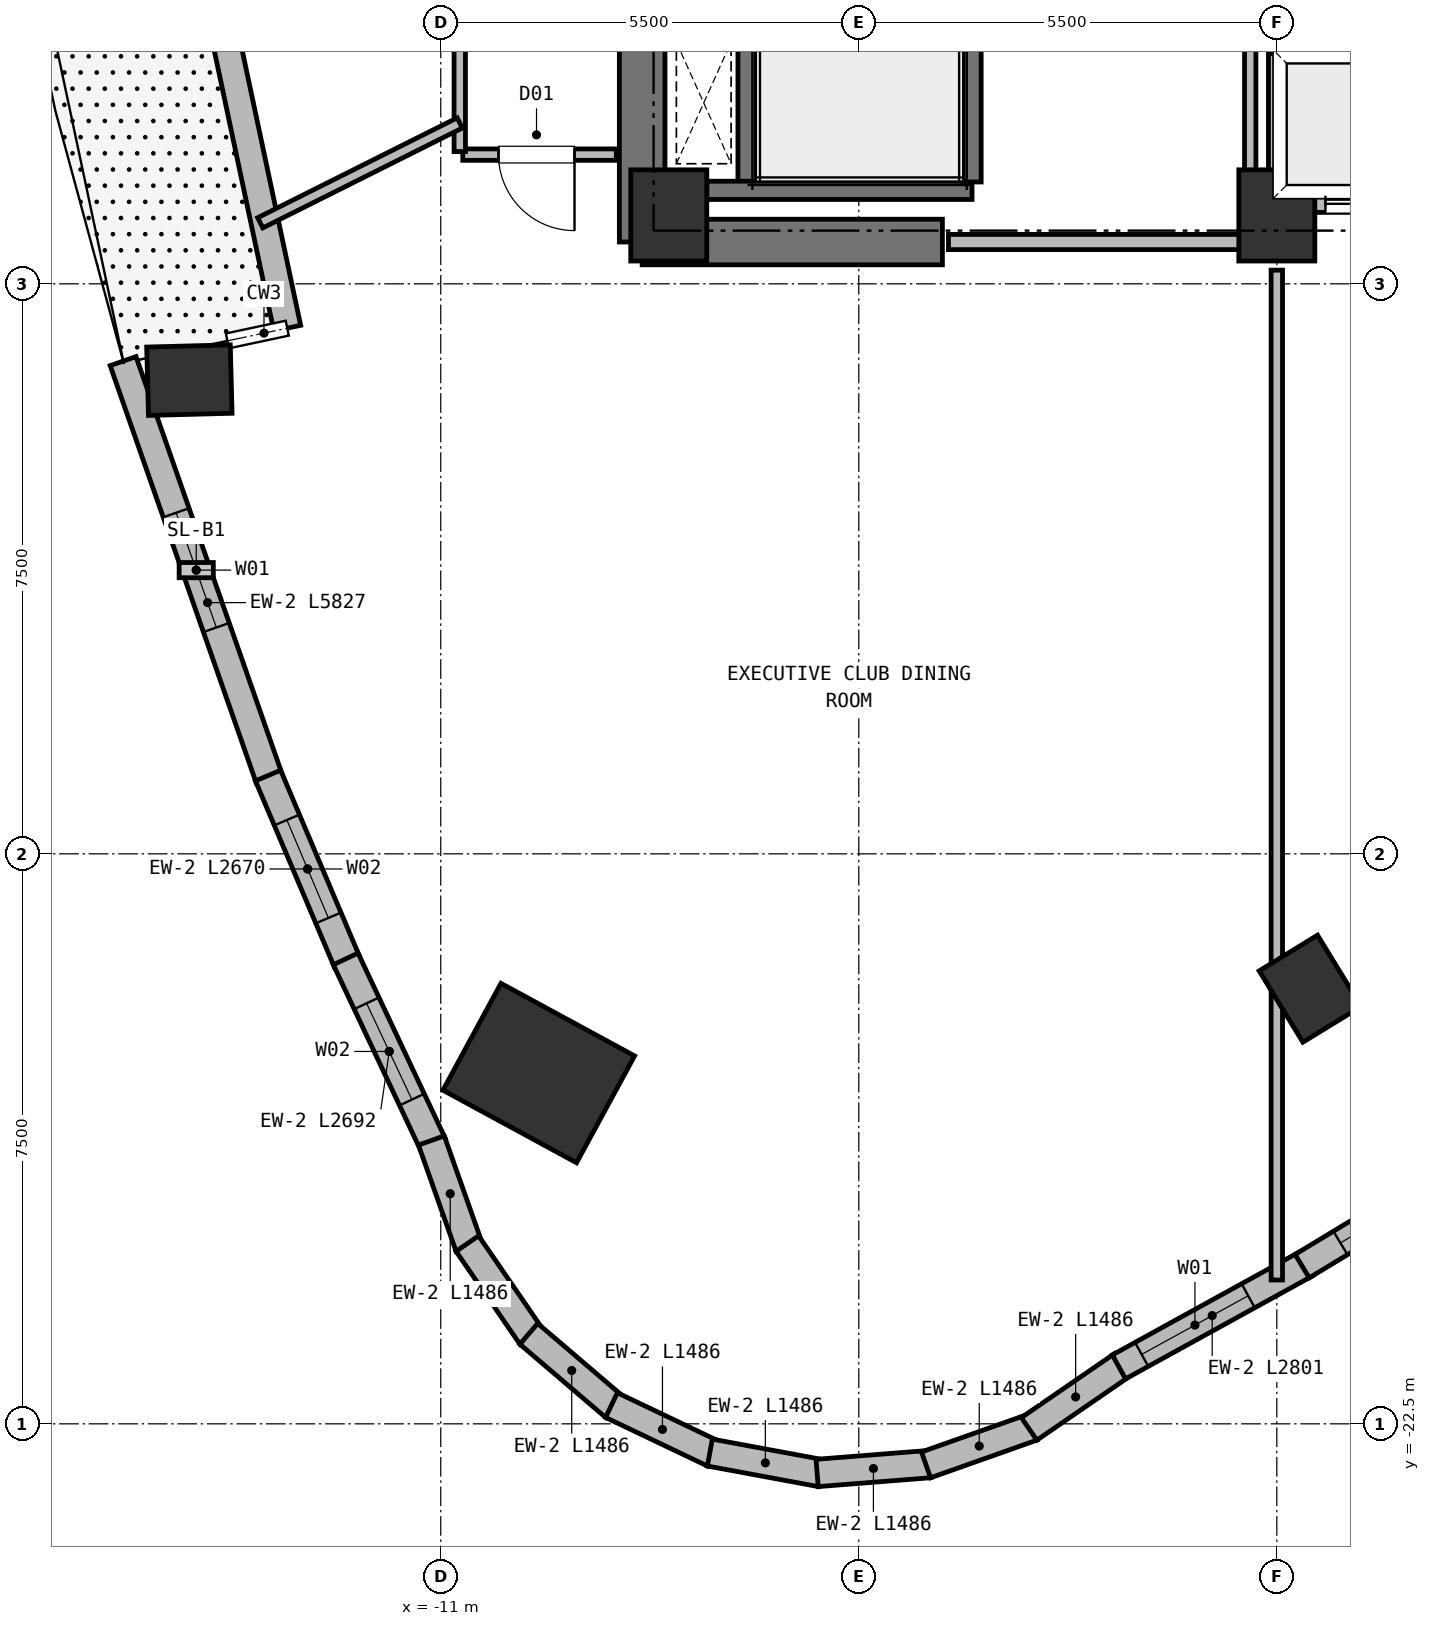
"""IFC4 building model, lengths in metres.
Left out: names, types, materials, properties, quantities, classifications, styles, units other than length and angle.
Written with IfcOpenShell. Run it as: python <this file> out.ifc"""

import sys

from ifc_helpers import new_model, si_unit, direction, frame, frame_2d, origin, origin_2d, place, context, subcontext, project, spatial, rectangle, extrude, element, fill, save


model = new_model("IFC4")
c1 = context("Model", 3, precision=1e-05, world=origin(), true_north=direction((0.0, 1.0)))
c2 = subcontext(c1, "Body", "Model", "MODEL_VIEW")
j1 = project(units=[si_unit("LENGTHUNIT", "METRE"), si_unit("PLANEANGLEUNIT", "RADIAN")], contexts=[c1])
p1 = place(None, origin())
s1 = spatial("IfcSite", under=j1, at=p1, CompositionType="ELEMENT")
p2 = place(p1, origin())
s2 = spatial("IfcBuilding", under=s1, at=p2, CompositionType="ELEMENT")
p3 = place(p2, frame((0.0, 0.0, 164.75)))
s3 = spatial("IfcBuildingStorey", under=s2, at=p3, CompositionType="ELEMENT", Elevation=164.75)
for number, where, z_axis, x_axis in (
    (1, (-8.0, -6.6, 0.0), (0.0, 0.0, 1.0), (1.0, 0.0, 0.0)),
    (2, (0.0, -6.6, 0.0), (0.0, 0.0, 1.0), (1.0, 0.0, 0.0)),
):
    element("IfcColumn", number, at=place(p3, frame(where, z_axis=z_axis, x_axis=x_axis)), inside=s3, PredefinedType="COLUMN", context=c2, shape_type="SweptSolid", body=[
        extrude(rectangle(XDim=1.0, YDim=1.2, at=origin_2d()), origin(), (0.0, 0.0, 1.0), 3.75),
    ])
p4 = place(p3, frame((-8.35, -6.95, 0.0), z_axis=(0.0, 0.0, 1.0), x_axis=(1.0, 0.0, 0.0)))
e3 = element("IfcWall", 3, at=p4, inside=s3, PredefinedType="SHEAR", context=c2, shape_type="SweptSolid", body=[
    extrude(rectangle(XDim=3.95, YDim=0.6, at=frame_2d((1.975, 0.0))), origin(), (0.0, 0.0, 1.0), 3.44),
])
p5 = place(p3, frame((-8.35, -6.95, 0.0), z_axis=(0.0, 0.0, 1.0), x_axis=(0.0, 1.0, 0.0)))
e4 = element("IfcWall", 4, at=p5, inside=s3, PredefinedType="SHEAR", context=c2, shape_type="SweptSolid", body=[
    extrude(rectangle(XDim=8.1, YDim=0.6, at=frame_2d((4.05, 0.0))), origin(), (0.0, 0.0, 1.0), 3.44),
])
p6 = place(p3, frame((-14.307, -8.768, 0.0), z_axis=(0.0, 0.0, 1.0), x_axis=(-0.026176948308, 0.999657324976, 0.0)))
e5 = element("IfcColumn", 5, at=p6, inside=s3, PredefinedType="COLUMN", context=c2, shape_type="SweptSolid", body=[
    extrude(rectangle(XDim=0.9, YDim=1.1, at=origin_2d()), origin(), (0.0, 0.0, 1.0), 3.75),
])
p7 = place(p3, frame((-9.71, -17.885, 0.0), z_axis=(0.0, 0.0, 1.0), x_axis=(0.47715876026, 0.878817112662, 0.0)))
e6 = element("IfcColumn", 6, at=p7, inside=s3, PredefinedType="COLUMN", context=c2, shape_type="SweptSolid", body=[
    extrude(rectangle(XDim=1.6, YDim=2.0, at=origin_2d()), origin(), (0.0, 0.0, 1.0), 3.75),
])
p8 = place(p3, frame((0.439, -16.774, 0.0), z_axis=(0.0, 0.0, 1.0), x_axis=(0.852640164354, 0.522498564716, 0.0)))
e7 = element("IfcColumn", 7, at=p8, inside=s3, PredefinedType="COLUMN", context=c2, shape_type="SweptSolid", body=[
    extrude(rectangle(XDim=0.9, YDim=1.1, at=origin_2d()), origin(), (0.0, 0.0, 1.0), 3.75),
])
p9 = place(p3, frame((-13.02, -8.083, 0.0), z_axis=(0.0, 0.0, 1.0), x_axis=(-0.207898343446, 0.97815043771, 0.0)))
e8 = element("IfcWall", 8, at=p9, inside=s3, PredefinedType="SOLIDWALL", context=c2, shape_type="SweptSolid", body=[
    extrude(rectangle(XDim=10.4, YDim=0.36, at=frame_2d((5.2, 0.0))), origin(), (0.0, 0.0, 1.0), 3.44),
])
p10 = place(p9, frame((4.375, 0.0, 0.0)))
e9 = element("IfcOpeningElement", 9, at=p10, cuts=e8, PredefinedType="OPENING", context=c2, shape_type="SweptSolid", body=[
    extrude(rectangle(XDim=1.65, YDim=2.25, at=frame_2d((0.825, 1.125))), frame((0.0, 0.19, 0.0), z_axis=(0.0, -1.0, 0.0), x_axis=(1.0, 0.0, 0.0)), (0.0, 0.0, 1.0), 0.38),
])
p11 = place(p3, frame((-13.254, -14.017, 0.0), z_axis=(0.0, 0.0, 1.0), x_axis=(-0.330408278921, 0.943838105408, 0.0)))
e10 = element("IfcWall", 10, at=p11, inside=s3, PredefinedType="SOLIDWALL", context=c2, shape_type="SweptSolid", body=[
    extrude(rectangle(XDim=5.827, YDim=0.36, at=frame_2d((2.914, 0.0))), origin(), (0.0, 0.0, 1.0), 3.44),
])
p12 = place(p11, frame((2.114, 0.0, 0.72)))
e11 = element("IfcOpeningElement", 11, at=p12, cuts=e10, PredefinedType="OPENING", context=c2, shape_type="SweptSolid", body=[
    extrude(rectangle(XDim=1.6, YDim=1.88, at=frame_2d((0.8, 0.94))), frame((0.0, 0.19, 0.0), z_axis=(0.0, -1.0, 0.0), x_axis=(1.0, 0.0, 0.0)), (0.0, 0.0, 1.0), 0.38),
])
p13 = place(p3, frame((-12.23, -16.428, 0.0), z_axis=(0.0, 0.0, 1.0), x_axis=(-0.39032906304, 0.9206754165, 0.0)))
e12 = element("IfcWall", 12, at=p13, inside=s3, PredefinedType="SOLIDWALL", context=c2, shape_type="SweptSolid", body=[
    extrude(rectangle(XDim=2.669, YDim=0.36, at=frame_2d((1.335, 0.0))), origin(), (0.0, 0.0, 1.0), 3.44),
])
p14 = place(p13, frame((0.635, 0.0, 0.72)))
e13 = element("IfcOpeningElement", 13, at=p14, cuts=e12, PredefinedType="OPENING", context=c2, shape_type="SweptSolid", body=[
    extrude(rectangle(XDim=1.4, YDim=1.84, at=frame_2d((0.7, 0.92))), frame((0.0, 0.19, 0.0), z_axis=(0.0, -1.0, 0.0), x_axis=(1.0, 0.0, 0.0)), (0.0, 0.0, 1.0), 0.38),
])
p15 = place(p3, frame((-11.105, -18.818, 0.0), z_axis=(0.0, 0.0, 1.0), x_axis=(-0.425862559053, 0.90478786508, 0.0)))
e14 = element("IfcWall", 14, at=p15, inside=s3, PredefinedType="SOLIDWALL", context=c2, shape_type="SweptSolid", body=[
    extrude(rectangle(XDim=2.692, YDim=0.36, at=frame_2d((1.346, 0.0))), origin(), (0.0, 0.0, 1.0), 3.44),
])
p16 = place(p15, frame((0.646, 0.0, 0.72)))
e15 = element("IfcOpeningElement", 15, at=p16, cuts=e14, PredefinedType="OPENING", context=c2, shape_type="SweptSolid", body=[
    extrude(rectangle(XDim=1.4, YDim=1.84, at=frame_2d((0.7, 0.92))), frame((0.0, 0.19, 0.0), z_axis=(0.0, -1.0, 0.0), x_axis=(1.0, 0.0, 0.0)), (0.0, 0.0, 1.0), 0.38),
])
p17 = place(p3, frame((-10.628, -20.173, 0.0), z_axis=(0.0, 0.0, 1.0), x_axis=(-0.333670746008, 0.942689680254, 0.0)))
e16 = element("IfcWall", 16, at=p17, inside=s3, PredefinedType="SOLIDWALL", context=c2, shape_type="SweptSolid", body=[
    extrude(rectangle(XDim=1.486, YDim=0.36, at=frame_2d((0.743, 0.0))), origin(), (0.0, 0.0, 1.0), 3.44),
])
p18 = place(p3, frame((-9.809, -21.353, 0.0), z_axis=(0.0, 0.0, 1.0), x_axis=(-0.566438155808, 0.824104250472, 0.0)))
e17 = element("IfcWall", 17, at=p18, inside=s3, PredefinedType="SOLIDWALL", context=c2, shape_type="SweptSolid", body=[
    extrude(rectangle(XDim=1.486, YDim=0.36, at=frame_2d((0.743, 0.0))), origin(), (0.0, 0.0, 1.0), 3.44),
])
for number, where, z_axis, x_axis in (
    (18, (-8.712, -22.281, 0.0), (0.0, 0.0, 1.0), (-0.76, 0.649, 0.0)),
    (19, (-7.413, -22.894, 0.0), (0.0, 0.0, 1.0), (-0.903, 0.431, 0.0)),
    (20, (-5.999, -23.149, 0.0), (0.0, 0.0, 1.0), (-0.983, 0.182, 0.0)),
    (21, (-4.567, -23.03, 0.0), (0.0, 0.0, 1.0), (-0.997, -0.079, 0.0)),
    (22, (-3.215, -22.544, 0.0), (0.0, 0.0, 1.0), (-0.943, -0.334, 0.0)),
):
    element("IfcWall", number, at=place(p3, frame(where, z_axis=z_axis, x_axis=x_axis)), inside=s3, PredefinedType="SOLIDWALL", context=c2, shape_type="SweptSolid", body=[
        extrude(rectangle(XDim=1.486, YDim=0.36, at=frame_2d((0.743, 0.0))), origin(), (0.0, 0.0, 1.0), 3.44),
    ])
p19 = place(p3, frame((-2.035, -21.725, 0.0), z_axis=(0.0, 0.0, 1.0), x_axis=(-0.824104250472, -0.566438155808, 0.0)))
e23 = element("IfcWall", 23, at=p19, inside=s3, PredefinedType="SOLIDWALL", context=c2, shape_type="SweptSolid", body=[
    extrude(rectangle(XDim=1.486, YDim=0.36, at=frame_2d((0.743, 0.0))), origin(), (0.0, 0.0, 1.0), 3.44),
])
p20 = place(p3, frame((0.377, -20.4, 0.0), z_axis=(0.0, 0.0, 1.0), x_axis=(-0.875996842893, -0.482316836988, 0.0)))
e24 = element("IfcWall", 24, at=p20, inside=s3, PredefinedType="SOLIDWALL", context=c2, shape_type="SweptSolid", body=[
    extrude(rectangle(XDim=2.801, YDim=0.36, at=frame_2d((1.401, 0.0))), origin(), (0.0, 0.0, 1.0), 3.44),
])
p21 = place(p20, frame((0.86, 0.0, 0.72)))
e25 = element("IfcOpeningElement", 25, at=p21, cuts=e24, PredefinedType="OPENING", context=c2, shape_type="SweptSolid", body=[
    extrude(rectangle(XDim=1.6, YDim=1.88, at=frame_2d((0.8, 0.94))), frame((0.0, 0.19, 0.0), z_axis=(0.0, -1.0, 0.0), x_axis=(1.0, 0.0, 0.0)), (0.0, 0.0, 1.0), 0.38),
])
p22 = place(p3, frame((2.71, -18.988, 0.0), z_axis=(0.0, 0.0, 1.0), x_axis=(-0.855665001601, -0.517530100609, 0.0)))
e26 = element("IfcWall", 26, at=p22, inside=s3, PredefinedType="SOLIDWALL", context=c2, shape_type="SweptSolid", body=[
    extrude(rectangle(XDim=2.778, YDim=0.36, at=frame_2d((1.389, 0.0))), origin(), (0.0, 0.0, 1.0), 3.44),
])
p23 = place(p22, frame((0.589, 0.0, 0.72)))
e27 = element("IfcOpeningElement", 27, at=p23, cuts=e26, PredefinedType="OPENING", context=c2, shape_type="SweptSolid", body=[
    extrude(rectangle(XDim=1.6, YDim=1.88, at=frame_2d((0.8, 0.94))), frame((0.0, 0.19, 0.0), z_axis=(0.0, -1.0, 0.0), x_axis=(1.0, 0.0, 0.0)), (0.0, 0.0, 1.0), 0.38),
])
p24 = place(p3, frame((-6.97, -6.16, 0.0), z_axis=(0.0, 0.0, 1.0), x_axis=(0.0, 1.0, 0.0)))
e28 = element("IfcWall", 28, at=p24, inside=s3, PredefinedType="SHEAR", context=c2, shape_type="SweptSolid", body=[
    extrude(rectangle(XDim=7.22, YDim=0.24, at=frame_2d((3.61, 0.0))), origin(), (0.0, 0.0, 1.0), 3.44),
])
p25 = place(p3, frame((-7.5, -6.27, 0.0), z_axis=(0.0, 0.0, 1.0), x_axis=(1.0, 0.0, 0.0)))
e29 = element("IfcWall", 29, at=p25, inside=s3, PredefinedType="SHEAR", context=c2, shape_type="SweptSolid", body=[
    extrude(rectangle(XDim=3.49, YDim=0.24, at=frame_2d((1.745, 0.0))), origin(), (0.0, 0.0, 1.0), 3.44),
])
p26 = place(p3, frame((-4.01, -6.16, 0.0), z_axis=(0.0, 0.0, 1.0), x_axis=(0.0, 1.0, 0.0)))
e30 = element("IfcWall", 30, at=p26, inside=s3, PredefinedType="SHEAR", context=c2, shape_type="SweptSolid", body=[
    extrude(rectangle(XDim=7.22, YDim=0.24, at=frame_2d((3.61, 0.0))), origin(), (0.0, 0.0, 1.0), 3.44),
])
p27 = place(p3, frame((0.0, -6.45, 0.0), z_axis=(0.0, 0.0, 1.0), x_axis=(1.0, 0.0, 0.0)))
e31 = element("IfcWall", 31, at=p27, inside=s3, PredefinedType="PARTITIONING", context=c2, shape_type="SweptSolid", body=[
    extrude(rectangle(XDim=1.86, YDim=0.22, at=frame_2d((0.93, 0.0))), origin(), (0.0, 0.0, 1.0), 3.06),
])
p28 = place(p27, frame((0.64, 0.0, 0.0)))
e32 = element("IfcOpeningElement", 32, at=p28, cuts=e31, PredefinedType="OPENING", context=c2, shape_type="SweptSolid", body=[
    extrude(rectangle(XDim=1.08, YDim=2.15, at=frame_2d((0.54, 1.075))), frame((0.0, 0.12, 0.0), z_axis=(0.0, -1.0, 0.0), x_axis=(1.0, 0.0, 0.0)), (0.0, 0.0, 1.0), 0.24),
])
for number, where, z_axis, x_axis in (
    (33, (0.0, -4.35, 0.0), (0.0, 0.0, 1.0), (1.0, 0.0, 0.0)),
    (34, (0.0, -6.33, 0.0), (0.0, 0.0, 1.0), (0.0, 1.0, 0.0)),
):
    element("IfcWall", number, at=place(p3, frame(where, z_axis=z_axis, x_axis=x_axis)), inside=s3, PredefinedType="PARTITIONING", context=c2, shape_type="SweptSolid", body=[
        extrude(rectangle(XDim=1.86, YDim=0.22, at=frame_2d((0.93, 0.0))), origin(), (0.0, 0.0, 1.0), 3.44),
    ])
p29 = place(p3, frame((-4.32, -6.95, 0.0), z_axis=(0.0, 0.0, 1.0), x_axis=(1.0, 0.0, 0.0)))
e35 = element("IfcWall", 35, at=p29, inside=s3, PredefinedType="PARTITIONING", context=c2, shape_type="SweptSolid", body=[
    extrude(rectangle(XDim=4.32, YDim=0.2, at=frame_2d((2.16, 0.0))), origin(), (0.0, 0.0, 1.0), 3.44),
])
p30 = place(p3, frame((-0.35, -6.58, 0.0), z_axis=(0.0, 0.0, 1.0), x_axis=(0.0, 1.0, 0.0)))
e36 = element("IfcWall", 36, at=p30, inside=s3, PredefinedType="PARTITIONING", context=c2, shape_type="SweptSolid", body=[
    extrude(rectangle(XDim=4.61, YDim=0.15, at=frame_2d((2.305, 0.0))), origin(), (0.0, 0.0, 1.0), 3.44),
])
p31 = place(p3, frame((-8.69, -5.8, 0.0), z_axis=(0.0, 0.0, 1.0), x_axis=(-1.0, 0.0, 0.0)))
e37 = element("IfcWall", 37, at=p31, inside=s3, PredefinedType="PARTITIONING", context=c2, shape_type="SweptSolid", body=[
    extrude(rectangle(XDim=2.02, YDim=0.15, at=frame_2d((1.01, 0.0))), origin(), (0.0, 0.0, 1.0), 3.44),
])
p32 = place(p31, frame((0.55, 0.0, 0.0)))
e38 = element("IfcOpeningElement", 38, at=p32, cuts=e37, PredefinedType="OPENING", context=c2, shape_type="SweptSolid", body=[
    extrude(rectangle(XDim=1.0, YDim=2.15, at=frame_2d((0.5, 1.075))), frame((0.0, 0.085, 0.0), z_axis=(0.0, -1.0, 0.0), x_axis=(1.0, 0.0, 0.0)), (0.0, 0.0, 1.0), 0.17),
])
p33 = place(p3, frame((-10.75, -5.76, 0.0), z_axis=(0.0, 0.0, 1.0), x_axis=(0.0, 1.0, 0.0)))
e39 = element("IfcWall", 39, at=p33, inside=s3, PredefinedType="PARTITIONING", context=c2, shape_type="SweptSolid", body=[
    extrude(rectangle(XDim=12.92, YDim=0.15, at=frame_2d((6.46, 0.0))), origin(), (0.0, 0.0, 1.0), 3.44),
])
p34 = place(p33, frame((5.95, 0.0, 0.0)))
e40 = element("IfcOpeningElement", 40, at=p34, cuts=e39, PredefinedType="OPENING", context=c2, shape_type="SweptSolid", body=[
    extrude(rectangle(XDim=1.0, YDim=2.15, at=frame_2d((0.5, 1.075))), frame((0.0, 0.085, 0.0), z_axis=(0.0, -1.0, 0.0), x_axis=(1.0, 0.0, 0.0)), (0.0, 0.0, 1.0), 0.17),
])
p35 = place(p3, frame((-10.75, -5.383, 0.0), z_axis=(0.0, 0.0, 1.0), x_axis=(-0.894160863769, -0.447745853922, 0.0)))
e41 = element("IfcWall", 41, at=p35, inside=s3, PredefinedType="PARTITIONING", context=c2, shape_type="SweptSolid", body=[
    extrude(rectangle(XDim=2.935, YDim=0.15, at=frame_2d((1.468, 0.0))), origin(), (0.0, 0.0, 1.0), 3.44),
])
p36 = place(p3, frame((0.0, -7.32, 0.0), z_axis=(0.0, 0.0, 1.0), x_axis=(0.0, -1.0, 0.0)))
e42 = element("IfcWall", 42, at=p36, inside=s3, PredefinedType="PARTITIONING", context=c2, shape_type="SweptSolid", body=[
    extrude(rectangle(XDim=13.287, YDim=0.15, at=frame_2d((6.644, 0.0))), origin(), (0.0, 0.0, 1.0), 3.44),
])
p37 = place(p12, origin())
e43 = element("IfcWindow", 43, at=p37, inside=s3, PartitioningType="SINGLE_PANEL", PredefinedType="WINDOW", context=c2, shape_type="SweptSolid", body=[
    extrude(rectangle(XDim=1.6, YDim=1.88, at=frame_2d((0.8, 0.94))), frame((0.0, 0.03, 0.0), z_axis=(0.0, -1.0, 0.0), x_axis=(1.0, 0.0, 0.0)), (0.0, 0.0, 1.0), 0.06),
])
fill(e11, e43)
p38 = place(p14, origin())
e44 = element("IfcWindow", 44, at=p38, inside=s3, PartitioningType="SINGLE_PANEL", PredefinedType="WINDOW", context=c2, shape_type="SweptSolid", body=[
    extrude(rectangle(XDim=1.4, YDim=1.84, at=frame_2d((0.7, 0.92))), frame((0.0, 0.03, 0.0), z_axis=(0.0, -1.0, 0.0), x_axis=(1.0, 0.0, 0.0)), (0.0, 0.0, 1.0), 0.06),
])
fill(e13, e44)
p39 = place(p16, origin())
e45 = element("IfcWindow", 45, at=p39, inside=s3, PartitioningType="SINGLE_PANEL", PredefinedType="WINDOW", context=c2, shape_type="SweptSolid", body=[
    extrude(rectangle(XDim=1.4, YDim=1.84, at=frame_2d((0.7, 0.92))), frame((0.0, 0.03, 0.0), z_axis=(0.0, -1.0, 0.0), x_axis=(1.0, 0.0, 0.0)), (0.0, 0.0, 1.0), 0.06),
])
fill(e15, e45)
p40 = place(p21, origin())
e46 = element("IfcWindow", 46, at=p40, inside=s3, PartitioningType="SINGLE_PANEL", PredefinedType="WINDOW", context=c2, shape_type="SweptSolid", body=[
    extrude(rectangle(XDim=1.6, YDim=1.88, at=frame_2d((0.8, 0.94))), frame((0.0, 0.03, 0.0), z_axis=(0.0, -1.0, 0.0), x_axis=(1.0, 0.0, 0.0)), (0.0, 0.0, 1.0), 0.06),
])
fill(e25, e46)
p41 = place(p23, origin())
e47 = element("IfcWindow", 47, at=p41, inside=s3, PartitioningType="SINGLE_PANEL", PredefinedType="WINDOW", context=c2, shape_type="SweptSolid", body=[
    extrude(rectangle(XDim=1.6, YDim=1.88, at=frame_2d((0.8, 0.94))), frame((0.0, 0.03, 0.0), z_axis=(0.0, -1.0, 0.0), x_axis=(1.0, 0.0, 0.0)), (0.0, 0.0, 1.0), 0.06),
])
fill(e27, e47)
p42 = place(p28, origin())
e48 = element("IfcDoor", 48, at=p42, inside=s3, OperationType="DOUBLE_DOOR_SLIDING", PredefinedType="DOOR", context=c2, shape_type="SweptSolid", body=[
    extrude(rectangle(XDim=1.08, YDim=2.15, at=frame_2d((0.54, 1.075))), frame((0.0, 0.025, 0.0), z_axis=(0.0, -1.0, 0.0), x_axis=(1.0, 0.0, 0.0)), (0.0, 0.0, 1.0), 0.05),
])
fill(e32, e48)
p43 = place(p32, origin())
e49 = element("IfcDoor", 49, at=p43, inside=s3, OperationType="SINGLE_SWING_LEFT", PredefinedType="DOOR", context=c2, shape_type="SweptSolid", body=[
    extrude(rectangle(XDim=1.0, YDim=2.15, at=frame_2d((0.5, 1.075))), frame((0.0, 0.025, 0.0), z_axis=(0.0, -1.0, 0.0), x_axis=(1.0, 0.0, 0.0)), (0.0, 0.0, 1.0), 0.05),
])
fill(e38, e49)
save(model, sys.argv[1])
